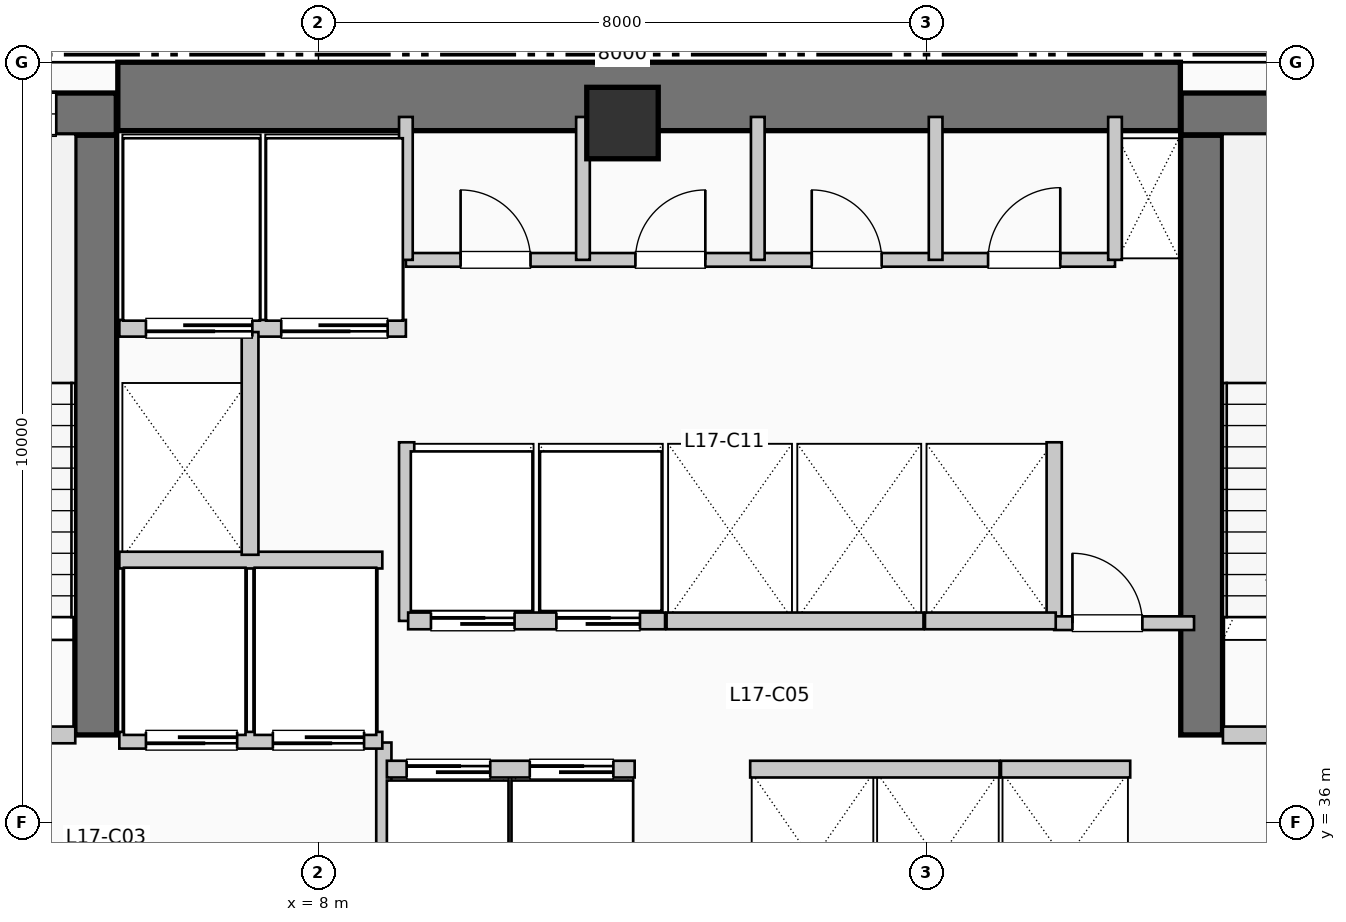
"""IFC4 building model, lengths in metres.
Left out: names, types, materials, properties, quantities, classifications, styles, units other than length and angle.
Written with IfcOpenShell. Run it as: python <this file> out.ifc"""

import sys

from ifc_helpers import new_model, si_unit, direction, frame, frame_2d, origin, origin_2d, place, context, subcontext, project, spatial, rectangle, extrude, element, fill, save


model = new_model("IFC4")
c1 = context("Model", 3, precision=1e-05, world=origin(), true_north=direction((0.0, 1.0)))
c2 = subcontext(c1, "Body", "Model", "MODEL_VIEW")
j1 = project(units=[si_unit("LENGTHUNIT", "METRE"), si_unit("PLANEANGLEUNIT", "RADIAN")], contexts=[c1])
p1 = place(None, origin())
s1 = spatial("IfcSite", under=j1, at=p1, CompositionType="ELEMENT")
p2 = place(p1, origin())
s2 = spatial("IfcBuilding", under=s1, at=p2, CompositionType="ELEMENT")
p3 = place(p2, frame((0.0, 0.0, 73.92)))
s3 = spatial("IfcBuildingStorey", under=s2, at=p3, CompositionType="ELEMENT", Elevation=73.92)
p4 = place(p3, frame((5.36, 45.55, 0.0), z_axis=(0.0, 0.0, 1.0), x_axis=(1.0, 0.0, 0.0)))
e1 = element("IfcWall", 1, at=p4, inside=s3, PredefinedType="SHEAR", context=c2, shape_type="SweptSolid", body=[
    extrude(rectangle(XDim=13.98, YDim=0.9, at=frame_2d((6.99, 0.0))), origin(), (0.0, 0.0, 1.0), 3.96),
])
p5 = place(p3, frame((5.07, 37.15, 0.0), z_axis=(0.0, 0.0, 1.0), x_axis=(0.0, 1.0, 0.0)))
e2 = element("IfcWall", 2, at=p5, inside=s3, PredefinedType="SHEAR", context=c2, shape_type="SweptSolid", body=[
    extrude(rectangle(XDim=7.89, YDim=0.55, at=frame_2d((3.945, 0.0))), origin(), (0.0, 0.0, 1.0), 3.96),
])
p6 = place(p3, frame((1.1, 45.32, 0.0), z_axis=(0.0, 0.0, 1.0), x_axis=(1.0, 0.0, 0.0)))
e3 = element("IfcWall", 3, at=p6, inside=s3, PredefinedType="SHEAR", context=c2, shape_type="SweptSolid", body=[
    extrude(rectangle(XDim=4.24, YDim=0.55, at=frame_2d((2.12, 0.0))), origin(), (0.0, 0.0, 1.0), 3.96),
])
p7 = place(p6, frame((2.05, 0.0, 1.05)))
e4 = element("IfcOpeningElement", 4, at=p7, cuts=e3, PredefinedType="OPENING", context=c2, shape_type="SweptSolid", body=[
    extrude(rectangle(XDim=1.4, YDim=1.8, at=frame_2d((0.7, 0.9))), frame((0.0, 0.285, 0.0), z_axis=(0.0, -1.0, 0.0), x_axis=(1.0, 0.0, 0.0)), (0.0, 0.0, 1.0), 0.57),
])
p8 = place(p3, frame((19.62, 37.15, 0.0), z_axis=(0.0, 0.0, 1.0), x_axis=(0.0, 1.0, 0.0)))
e5 = element("IfcWall", 5, at=p8, inside=s3, PredefinedType="SHEAR", context=c2, shape_type="SweptSolid", body=[
    extrude(rectangle(XDim=7.89, YDim=0.55, at=frame_2d((3.945, 0.0))), origin(), (0.0, 0.0, 1.0), 3.96),
])
p9 = place(p3, frame((19.35, 45.32, 0.0), z_axis=(0.0, 0.0, 1.0), x_axis=(1.0, 0.0, 0.0)))
e6 = element("IfcWall", 6, at=p9, inside=s3, PredefinedType="SHEAR", context=c2, shape_type="SweptSolid", body=[
    extrude(rectangle(XDim=3.69, YDim=0.55, at=frame_2d((1.845, 0.0))), origin(), (0.0, 0.0, 1.0), 3.96),
])
p10 = place(p9, frame((1.15, 0.0, 1.05)))
e7 = element("IfcOpeningElement", 7, at=p10, cuts=e6, PredefinedType="OPENING", context=c2, shape_type="SweptSolid", body=[
    extrude(rectangle(XDim=1.4, YDim=1.8, at=frame_2d((0.7, 0.9))), frame((0.0, 0.285, 0.0), z_axis=(0.0, -1.0, 0.0), x_axis=(1.0, 0.0, 0.0)), (0.0, 0.0, 1.0), 0.57),
])
p11 = place(p3, frame((12.0, 45.2, 0.0), z_axis=(0.0, 0.0, 1.0), x_axis=(1.0, 0.0, 0.0)))
e8 = element("IfcColumn", 8, at=p11, inside=s3, PredefinedType="COLUMN", context=c2, shape_type="SweptSolid", body=[
    extrude(rectangle(XDim=0.94, YDim=0.94, at=origin_2d()), origin(), (0.0, 0.0, 1.0), 3.96),
])
p12 = place(p3, frame((1.65, 37.15, 0.0), z_axis=(0.0, 0.0, 1.0), x_axis=(1.0, 0.0, 0.0)))
e9 = element("IfcWall", 9, at=p12, inside=s3, PredefinedType="PARTITIONING", context=c2, shape_type="SweptSolid", body=[
    extrude(rectangle(XDim=3.15, YDim=0.22, at=frame_2d((1.575, 0.0))), origin(), (0.0, 0.0, 1.0), 3.71),
])
p13 = place(p12, frame((2.05, 0.0, 0.0), z_axis=(0.0, 0.0, 1.0), x_axis=(-1.0, 0.0, 0.0)))
e10 = element("IfcOpeningElement", 10, at=p13, cuts=e9, PredefinedType="OPENING", context=c2, shape_type="SweptSolid", body=[
    extrude(rectangle(XDim=1.05, YDim=2.15, at=frame_2d((0.525, 1.075))), frame((0.0, 0.12, 0.0), z_axis=(0.0, -1.0, 0.0), x_axis=(1.0, 0.0, 0.0)), (0.0, 0.0, 1.0), 0.24),
])
p14 = place(p3, frame((8.86, 34.55, 0.0), z_axis=(0.0, 0.0, 1.0), x_axis=(0.0, 1.0, 0.0)))
e11 = element("IfcWall", 11, at=p14, inside=s3, PredefinedType="PARTITIONING", context=c2, shape_type="SweptSolid", body=[
    extrude(rectangle(XDim=2.5, YDim=0.2, at=frame_2d((1.25, 0.0))), origin(), (0.0, 0.0, 1.0), 3.71),
])
p15 = place(p3, frame((19.9, 37.15, 0.0), z_axis=(0.0, 0.0, 1.0), x_axis=(1.0, 0.0, 0.0)))
e12 = element("IfcWall", 12, at=p15, inside=s3, PredefinedType="PARTITIONING", context=c2, shape_type="SweptSolid", body=[
    extrude(rectangle(XDim=3.15, YDim=0.22, at=frame_2d((1.575, 0.0))), origin(), (0.0, 0.0, 1.0), 3.71),
])
p16 = place(p15, frame((2.05, 0.0, 0.0), z_axis=(0.0, 0.0, 1.0), x_axis=(-1.0, 0.0, 0.0)))
e13 = element("IfcOpeningElement", 13, at=p16, cuts=e12, PredefinedType="OPENING", context=c2, shape_type="SweptSolid", body=[
    extrude(rectangle(XDim=1.05, YDim=2.15, at=frame_2d((0.525, 1.075))), frame((0.0, 0.12, 0.0), z_axis=(0.0, -1.0, 0.0), x_axis=(1.0, 0.0, 0.0)), (0.0, 0.0, 1.0), 0.24),
])
p17 = place(p3, frame((5.38, 37.08, 0.0), z_axis=(0.0, 0.0, 1.0), x_axis=(1.0, 0.0, 0.0)))
e14 = element("IfcWall", 14, at=p17, inside=s3, PredefinedType="PARTITIONING", context=c2, shape_type="SweptSolid", body=[
    extrude(rectangle(XDim=3.46, YDim=0.22, at=frame_2d((1.73, 0.0))), origin(), (0.0, 0.0, 1.0), 3.71),
])
p18 = place(p17, frame((1.55, 0.0, 0.0), z_axis=(0.0, 0.0, 1.0), x_axis=(-1.0, 0.0, 0.0)))
e15 = element("IfcOpeningElement", 15, at=p18, cuts=e14, PredefinedType="OPENING", context=c2, shape_type="SweptSolid", body=[
    extrude(rectangle(XDim=1.2, YDim=2.2, at=frame_2d((0.6, 1.1))), frame((0.0, 0.12, 0.0), z_axis=(0.0, -1.0, 0.0), x_axis=(1.0, 0.0, 0.0)), (0.0, 0.0, 1.0), 0.24),
])
p19 = place(p17, frame((3.22, 0.0, 0.0), z_axis=(0.0, 0.0, 1.0), x_axis=(-1.0, 0.0, 0.0)))
e16 = element("IfcOpeningElement", 16, at=p19, cuts=e14, PredefinedType="OPENING", context=c2, shape_type="SweptSolid", body=[
    extrude(rectangle(XDim=1.2, YDim=2.2, at=frame_2d((0.6, 1.1))), frame((0.0, 0.12, 0.0), z_axis=(0.0, -1.0, 0.0), x_axis=(1.0, 0.0, 0.0)), (0.0, 0.0, 1.0), 0.24),
])
p20 = place(p3, frame((5.38, 39.45, 0.0), z_axis=(0.0, 0.0, 1.0), x_axis=(1.0, 0.0, 0.0)))
e17 = element("IfcWall", 17, at=p20, inside=s3, PredefinedType="PARTITIONING", context=c2, shape_type="SweptSolid", body=[
    extrude(rectangle(XDim=3.46, YDim=0.22, at=frame_2d((1.73, 0.0))), origin(), (0.0, 0.0, 1.0), 3.71),
])
p21 = place(p3, frame((5.38, 42.5, 0.0), z_axis=(0.0, 0.0, 1.0), x_axis=(1.0, 0.0, 0.0)))
e18 = element("IfcWall", 18, at=p21, inside=s3, PredefinedType="PARTITIONING", context=c2, shape_type="SweptSolid", body=[
    extrude(rectangle(XDim=3.77, YDim=0.22, at=frame_2d((1.885, 0.0))), origin(), (0.0, 0.0, 1.0), 3.71),
])
p22 = place(p21, frame((1.75, 0.0, 0.0), z_axis=(0.0, 0.0, 1.0), x_axis=(-1.0, 0.0, 0.0)))
e19 = element("IfcOpeningElement", 19, at=p22, cuts=e18, PredefinedType="OPENING", context=c2, shape_type="SweptSolid", body=[
    extrude(rectangle(XDim=1.4, YDim=2.2, at=frame_2d((0.7, 1.1))), frame((0.0, 0.12, 0.0), z_axis=(0.0, -1.0, 0.0), x_axis=(1.0, 0.0, 0.0)), (0.0, 0.0, 1.0), 0.24),
])
p23 = place(p21, frame((3.53, 0.0, 0.0), z_axis=(0.0, 0.0, 1.0), x_axis=(-1.0, 0.0, 0.0)))
e20 = element("IfcOpeningElement", 20, at=p23, cuts=e18, PredefinedType="OPENING", context=c2, shape_type="SweptSolid", body=[
    extrude(rectangle(XDim=1.4, YDim=2.2, at=frame_2d((0.7, 1.1))), frame((0.0, 0.12, 0.0), z_axis=(0.0, -1.0, 0.0), x_axis=(1.0, 0.0, 0.0)), (0.0, 0.0, 1.0), 0.24),
])
p24 = place(p3, frame((7.1, 39.52, 0.0), z_axis=(0.0, 0.0, 1.0), x_axis=(0.0, 1.0, 0.0)))
e21 = element("IfcWall", 21, at=p24, inside=s3, PredefinedType="PARTITIONING", context=c2, shape_type="SweptSolid", body=[
    extrude(rectangle(XDim=2.93, YDim=0.22, at=frame_2d((1.465, 0.0))), origin(), (0.0, 0.0, 1.0), 3.71),
])
for number, where, z_axis, x_axis in (
    (22, (9.16, 38.65, 0.0), (0.0, 0.0, 1.0), (0.0, 1.0, 0.0)),
    (23, (17.68, 38.65, 0.0), (0.0, 0.0, 1.0), (0.0, 1.0, 0.0)),
):
    element("IfcWall", number, at=place(p3, frame(where, z_axis=z_axis, x_axis=x_axis)), inside=s3, PredefinedType="PARTITIONING", context=c2, shape_type="SweptSolid", body=[
        extrude(rectangle(XDim=2.35, YDim=0.2, at=frame_2d((1.175, 0.0))), origin(), (0.0, 0.0, 1.0), 3.71),
    ])
p25 = place(p3, frame((17.68, 38.62, 0.0), z_axis=(0.0, 0.0, 1.0), x_axis=(1.0, 0.0, 0.0)))
e24 = element("IfcWall", 24, at=p25, inside=s3, PredefinedType="PARTITIONING", context=c2, shape_type="SweptSolid", body=[
    extrude(rectangle(XDim=1.84, YDim=0.18, at=frame_2d((0.92, 0.0))), origin(), (0.0, 0.0, 1.0), 3.71),
])
p26 = place(p25, frame((0.24, 0.0, 0.0)))
e25 = element("IfcOpeningElement", 25, at=p26, cuts=e24, PredefinedType="OPENING", context=c2, shape_type="SweptSolid", body=[
    extrude(rectangle(XDim=0.92, YDim=2.1, at=frame_2d((0.46, 1.05))), frame((0.0, 0.1, 0.0), z_axis=(0.0, -1.0, 0.0), x_axis=(1.0, 0.0, 0.0)), (0.0, 0.0, 1.0), 0.2),
])
p27 = place(p3, frame((8.9, 36.7, 0.0), z_axis=(0.0, 0.0, 1.0), x_axis=(1.0, 0.0, 0.0)))
e26 = element("IfcWall", 26, at=p27, inside=s3, PredefinedType="PARTITIONING", context=c2, shape_type="SweptSolid", body=[
    extrude(rectangle(XDim=3.26, YDim=0.22, at=frame_2d((1.63, 0.0))), origin(), (0.0, 0.0, 1.0), 3.71),
])
p28 = place(p27, frame((0.26, 0.0, 0.0)))
e27 = element("IfcOpeningElement", 27, at=p28, cuts=e26, PredefinedType="OPENING", context=c2, shape_type="SweptSolid", body=[
    extrude(rectangle(XDim=1.1, YDim=2.2, at=frame_2d((0.55, 1.1))), frame((0.0, 0.12, 0.0), z_axis=(0.0, -1.0, 0.0), x_axis=(1.0, 0.0, 0.0)), (0.0, 0.0, 1.0), 0.24),
])
p29 = place(p27, frame((1.88, 0.0, 0.0)))
e28 = element("IfcOpeningElement", 28, at=p29, cuts=e26, PredefinedType="OPENING", context=c2, shape_type="SweptSolid", body=[
    extrude(rectangle(XDim=1.1, YDim=2.2, at=frame_2d((0.55, 1.1))), frame((0.0, 0.12, 0.0), z_axis=(0.0, -1.0, 0.0), x_axis=(1.0, 0.0, 0.0)), (0.0, 0.0, 1.0), 0.24),
])
p30 = place(p3, frame((9.18, 38.65, 0.0), z_axis=(0.0, 0.0, 1.0), x_axis=(1.0, 0.0, 0.0)))
e29 = element("IfcWall", 29, at=p30, inside=s3, PredefinedType="PARTITIONING", context=c2, shape_type="SweptSolid", body=[
    extrude(rectangle(XDim=3.38, YDim=0.22, at=frame_2d((1.69, 0.0))), origin(), (0.0, 0.0, 1.0), 3.71),
])
p31 = place(p30, frame((0.3, 0.0, 0.0)))
e30 = element("IfcOpeningElement", 30, at=p31, cuts=e29, PredefinedType="OPENING", context=c2, shape_type="SweptSolid", body=[
    extrude(rectangle(XDim=1.1, YDim=2.2, at=frame_2d((0.55, 1.1))), frame((0.0, 0.12, 0.0), z_axis=(0.0, -1.0, 0.0), x_axis=(1.0, 0.0, 0.0)), (0.0, 0.0, 1.0), 0.24),
])
p32 = place(p30, frame((1.95, 0.0, 0.0)))
e31 = element("IfcOpeningElement", 31, at=p32, cuts=e29, PredefinedType="OPENING", context=c2, shape_type="SweptSolid", body=[
    extrude(rectangle(XDim=1.1, YDim=2.2, at=frame_2d((0.55, 1.1))), frame((0.0, 0.12, 0.0), z_axis=(0.0, -1.0, 0.0), x_axis=(1.0, 0.0, 0.0)), (0.0, 0.0, 1.0), 0.24),
])
p33 = place(p3, frame((13.68, 36.7, 0.0), z_axis=(0.0, 0.0, 1.0), x_axis=(1.0, 0.0, 0.0)))
e32 = element("IfcWall", 32, at=p33, inside=s3, PredefinedType="PARTITIONING", context=c2, shape_type="SweptSolid", body=[
    extrude(rectangle(XDim=3.28, YDim=0.22, at=frame_2d((1.64, 0.0))), origin(), (0.0, 0.0, 1.0), 3.71),
])
p34 = place(p3, frame((12.58, 38.65, 0.0), z_axis=(0.0, 0.0, 1.0), x_axis=(1.0, 0.0, 0.0)))
e33 = element("IfcWall", 33, at=p34, inside=s3, PredefinedType="PARTITIONING", context=c2, shape_type="SweptSolid", body=[
    extrude(rectangle(XDim=3.38, YDim=0.22, at=frame_2d((1.69, 0.0))), origin(), (0.0, 0.0, 1.0), 3.71),
])
p35 = place(p3, frame((16.98, 36.7, 0.0), z_axis=(0.0, 0.0, 1.0), x_axis=(1.0, 0.0, 0.0)))
e34 = element("IfcWall", 34, at=p35, inside=s3, PredefinedType="PARTITIONING", context=c2, shape_type="SweptSolid", body=[
    extrude(rectangle(XDim=1.7, YDim=0.22, at=frame_2d((0.85, 0.0))), origin(), (0.0, 0.0, 1.0), 3.71),
])
p36 = place(p3, frame((15.98, 38.65, 0.0), z_axis=(0.0, 0.0, 1.0), x_axis=(1.0, 0.0, 0.0)))
e35 = element("IfcWall", 35, at=p36, inside=s3, PredefinedType="PARTITIONING", context=c2, shape_type="SweptSolid", body=[
    extrude(rectangle(XDim=1.72, YDim=0.22, at=frame_2d((0.86, 0.0))), origin(), (0.0, 0.0, 1.0), 3.71),
])
p37 = place(p3, frame((9.15, 43.4, 0.0), z_axis=(0.0, 0.0, 1.0), x_axis=(1.0, 0.0, 0.0)))
e36 = element("IfcWall", 36, at=p37, inside=s3, PredefinedType="PLUMBINGWALL", context=c2, shape_type="SweptSolid", body=[
    extrude(rectangle(XDim=9.33, YDim=0.18, at=frame_2d((4.665, 0.0))), origin(), (0.0, 0.0, 1.0), 3.71),
])
p38 = place(p37, frame((0.72, 0.0, 0.0)))
e37 = element("IfcOpeningElement", 37, at=p38, cuts=e36, PredefinedType="OPENING", context=c2, shape_type="SweptSolid", body=[
    extrude(rectangle(XDim=0.92, YDim=2.1, at=frame_2d((0.46, 1.05))), frame((0.0, 0.1, 0.0), z_axis=(0.0, -1.0, 0.0), x_axis=(1.0, 0.0, 0.0)), (0.0, 0.0, 1.0), 0.2),
])
p39 = place(p37, frame((3.02, 0.0, 0.0)))
e38 = element("IfcOpeningElement", 38, at=p39, cuts=e36, PredefinedType="OPENING", context=c2, shape_type="SweptSolid", body=[
    extrude(rectangle(XDim=0.92, YDim=2.1, at=frame_2d((0.46, 1.05))), frame((0.0, 0.1, 0.0), z_axis=(0.0, -1.0, 0.0), x_axis=(1.0, 0.0, 0.0)), (0.0, 0.0, 1.0), 0.2),
])
p40 = place(p37, frame((5.34, 0.0, 0.0)))
e39 = element("IfcOpeningElement", 39, at=p40, cuts=e36, PredefinedType="OPENING", context=c2, shape_type="SweptSolid", body=[
    extrude(rectangle(XDim=0.92, YDim=2.1, at=frame_2d((0.46, 1.05))), frame((0.0, 0.1, 0.0), z_axis=(0.0, -1.0, 0.0), x_axis=(1.0, 0.0, 0.0)), (0.0, 0.0, 1.0), 0.2),
])
p41 = place(p37, frame((7.66, 0.0, 0.0)))
e40 = element("IfcOpeningElement", 40, at=p41, cuts=e36, PredefinedType="OPENING", context=c2, shape_type="SweptSolid", body=[
    extrude(rectangle(XDim=0.95, YDim=2.1, at=frame_2d((0.475, 1.05))), frame((0.0, 0.1, 0.0), z_axis=(0.0, -1.0, 0.0), x_axis=(1.0, 0.0, 0.0)), (0.0, 0.0, 1.0), 0.2),
])
for number, where, z_axis, x_axis in (
    (41, (9.15, 43.4, 0.0), (0.0, 0.0, 1.0), (0.0, 1.0, 0.0)),
    (42, (18.48, 43.4, 0.0), (0.0, 0.0, 1.0), (0.0, 1.0, 0.0)),
    (43, (11.48, 43.4, 0.0), (0.0, 0.0, 1.0), (0.0, 1.0, 0.0)),
    (44, (13.78, 43.4, 0.0), (0.0, 0.0, 1.0), (0.0, 1.0, 0.0)),
    (45, (16.12, 43.4, 0.0), (0.0, 0.0, 1.0), (0.0, 1.0, 0.0)),
):
    element("IfcWall", number, at=place(p3, frame(where, z_axis=z_axis, x_axis=x_axis)), inside=s3, PredefinedType="PLUMBINGWALL", context=c2, shape_type="SweptSolid", body=[
        extrude(rectangle(XDim=1.88, YDim=0.18, at=frame_2d((0.94, 0.0))), origin(), (0.0, 0.0, 1.0), 3.71),
    ])
p42 = place(p7, origin())
e46 = element("IfcWindow", 46, at=p42, inside=s3, PartitioningType="SINGLE_PANEL", PredefinedType="WINDOW", context=c2, shape_type="SweptSolid", body=[
    extrude(rectangle(XDim=1.4, YDim=1.8, at=frame_2d((0.7, 0.9))), frame((0.0, 0.03, 0.0), z_axis=(0.0, -1.0, 0.0), x_axis=(1.0, 0.0, 0.0)), (0.0, 0.0, 1.0), 0.06),
])
fill(e4, e46)
p43 = place(p18, origin())
e47 = element("IfcDoor", 47, at=p43, inside=s3, OperationType="SLIDING_TO_RIGHT", PredefinedType="DOOR", context=c2, shape_type="SweptSolid", body=[
    extrude(rectangle(XDim=1.2, YDim=2.2, at=frame_2d((0.6, 1.1))), frame((0.0, 0.025, 0.0), z_axis=(0.0, -1.0, 0.0), x_axis=(1.0, 0.0, 0.0)), (0.0, 0.0, 1.0), 0.05),
])
fill(e15, e47)
p44 = place(p19, origin())
e48 = element("IfcDoor", 48, at=p44, inside=s3, OperationType="SLIDING_TO_RIGHT", PredefinedType="DOOR", context=c2, shape_type="SweptSolid", body=[
    extrude(rectangle(XDim=1.2, YDim=2.2, at=frame_2d((0.6, 1.1))), frame((0.0, 0.025, 0.0), z_axis=(0.0, -1.0, 0.0), x_axis=(1.0, 0.0, 0.0)), (0.0, 0.0, 1.0), 0.05),
])
fill(e16, e48)
p45 = place(p22, origin())
e49 = element("IfcDoor", 49, at=p45, inside=s3, OperationType="SLIDING_TO_LEFT", PredefinedType="DOOR", context=c2, shape_type="SweptSolid", body=[
    extrude(rectangle(XDim=1.4, YDim=2.2, at=frame_2d((0.7, 1.1))), frame((0.0, 0.025, 0.0), z_axis=(0.0, -1.0, 0.0), x_axis=(1.0, 0.0, 0.0)), (0.0, 0.0, 1.0), 0.05),
])
fill(e19, e49)
p46 = place(p23, origin())
e50 = element("IfcDoor", 50, at=p46, inside=s3, OperationType="SLIDING_TO_LEFT", PredefinedType="DOOR", context=c2, shape_type="SweptSolid", body=[
    extrude(rectangle(XDim=1.4, YDim=2.2, at=frame_2d((0.7, 1.1))), frame((0.0, 0.025, 0.0), z_axis=(0.0, -1.0, 0.0), x_axis=(1.0, 0.0, 0.0)), (0.0, 0.0, 1.0), 0.05),
])
fill(e20, e50)
p47 = place(p26, origin())
e51 = element("IfcDoor", 51, at=p47, inside=s3, OperationType="SINGLE_SWING_LEFT", PredefinedType="DOOR", context=c2, shape_type="SweptSolid", body=[
    extrude(rectangle(XDim=0.92, YDim=2.1, at=frame_2d((0.46, 1.05))), frame((0.0, 0.025, 0.0), z_axis=(0.0, -1.0, 0.0), x_axis=(1.0, 0.0, 0.0)), (0.0, 0.0, 1.0), 0.05),
])
fill(e25, e51)
p48 = place(p28, origin())
e52 = element("IfcDoor", 52, at=p48, inside=s3, OperationType="SLIDING_TO_LEFT", PredefinedType="DOOR", context=c2, shape_type="SweptSolid", body=[
    extrude(rectangle(XDim=1.1, YDim=2.2, at=frame_2d((0.55, 1.1))), frame((0.0, 0.025, 0.0), z_axis=(0.0, -1.0, 0.0), x_axis=(1.0, 0.0, 0.0)), (0.0, 0.0, 1.0), 0.05),
])
fill(e27, e52)
p49 = place(p29, origin())
e53 = element("IfcDoor", 53, at=p49, inside=s3, OperationType="SLIDING_TO_LEFT", PredefinedType="DOOR", context=c2, shape_type="SweptSolid", body=[
    extrude(rectangle(XDim=1.1, YDim=2.2, at=frame_2d((0.55, 1.1))), frame((0.0, 0.025, 0.0), z_axis=(0.0, -1.0, 0.0), x_axis=(1.0, 0.0, 0.0)), (0.0, 0.0, 1.0), 0.05),
])
fill(e28, e53)
p50 = place(p31, origin())
e54 = element("IfcDoor", 54, at=p50, inside=s3, OperationType="SLIDING_TO_LEFT", PredefinedType="DOOR", context=c2, shape_type="SweptSolid", body=[
    extrude(rectangle(XDim=1.1, YDim=2.2, at=frame_2d((0.55, 1.1))), frame((0.0, 0.025, 0.0), z_axis=(0.0, -1.0, 0.0), x_axis=(1.0, 0.0, 0.0)), (0.0, 0.0, 1.0), 0.05),
])
fill(e30, e54)
p51 = place(p32, origin())
e55 = element("IfcDoor", 55, at=p51, inside=s3, OperationType="SLIDING_TO_LEFT", PredefinedType="DOOR", context=c2, shape_type="SweptSolid", body=[
    extrude(rectangle(XDim=1.1, YDim=2.2, at=frame_2d((0.55, 1.1))), frame((0.0, 0.025, 0.0), z_axis=(0.0, -1.0, 0.0), x_axis=(1.0, 0.0, 0.0)), (0.0, 0.0, 1.0), 0.05),
])
fill(e31, e55)
p52 = place(p38, origin())
e56 = element("IfcDoor", 56, at=p52, inside=s3, OperationType="SINGLE_SWING_LEFT", PredefinedType="DOOR", context=c2, shape_type="SweptSolid", body=[
    extrude(rectangle(XDim=0.92, YDim=2.1, at=frame_2d((0.46, 1.05))), frame((0.0, 0.025, 0.0), z_axis=(0.0, -1.0, 0.0), x_axis=(1.0, 0.0, 0.0)), (0.0, 0.0, 1.0), 0.05),
])
fill(e37, e56)
p53 = place(p39, origin())
e57 = element("IfcDoor", 57, at=p53, inside=s3, OperationType="SINGLE_SWING_RIGHT", PredefinedType="DOOR", context=c2, shape_type="SweptSolid", body=[
    extrude(rectangle(XDim=0.92, YDim=2.1, at=frame_2d((0.46, 1.05))), frame((0.0, 0.025, 0.0), z_axis=(0.0, -1.0, 0.0), x_axis=(1.0, 0.0, 0.0)), (0.0, 0.0, 1.0), 0.05),
])
fill(e38, e57)
p54 = place(p40, origin())
e58 = element("IfcDoor", 58, at=p54, inside=s3, OperationType="SINGLE_SWING_LEFT", PredefinedType="DOOR", context=c2, shape_type="SweptSolid", body=[
    extrude(rectangle(XDim=0.92, YDim=2.1, at=frame_2d((0.46, 1.05))), frame((0.0, 0.025, 0.0), z_axis=(0.0, -1.0, 0.0), x_axis=(1.0, 0.0, 0.0)), (0.0, 0.0, 1.0), 0.05),
])
fill(e39, e58)
p55 = place(p41, origin())
e59 = element("IfcDoor", 59, at=p55, inside=s3, OperationType="SINGLE_SWING_RIGHT", PredefinedType="DOOR", context=c2, shape_type="SweptSolid", body=[
    extrude(rectangle(XDim=0.95, YDim=2.1, at=frame_2d((0.475, 1.05))), frame((0.0, 0.025, 0.0), z_axis=(0.0, -1.0, 0.0), x_axis=(1.0, 0.0, 0.0)), (0.0, 0.0, 1.0), 0.05),
])
fill(e40, e59)
save(model, sys.argv[1])
